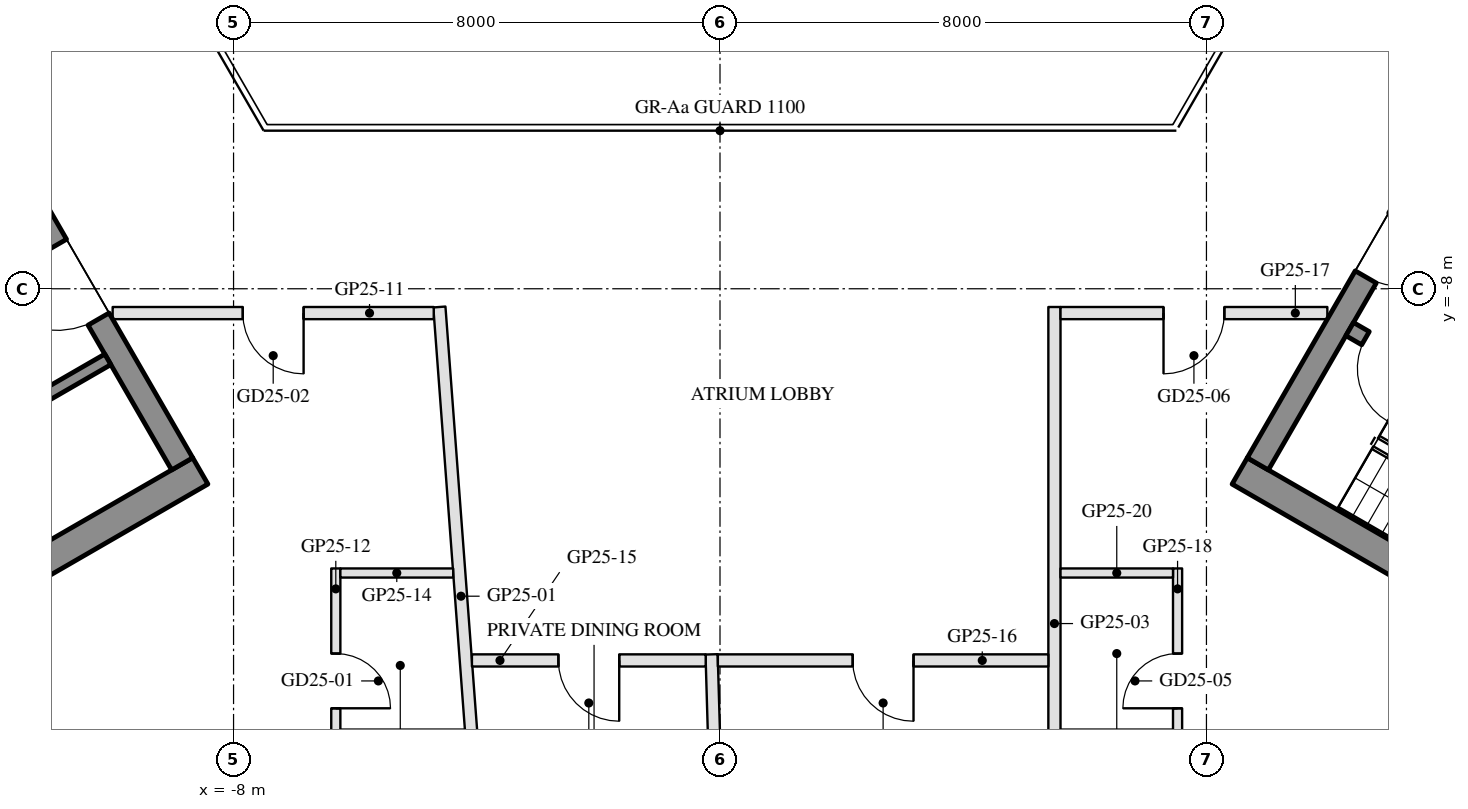
"""IFC4 building model, lengths in metres.
Left out: names, types, materials, properties, quantities, classifications, styles, units other than length and angle.
Written with IfcOpenShell. Run it as: python <this file> out.ifc"""

import sys

from ifc_helpers import new_model, si_unit, direction, frame, frame_2d, origin, place, context, subcontext, project, spatial, rectangle, extrude, element, fill, save


model = new_model("IFC4")
c1 = context("Model", 3, precision=1e-05, world=origin(), true_north=direction((0.0, 1.0)))
c2 = subcontext(c1, "Body", "Model", "MODEL_VIEW")
j1 = project(units=[si_unit("LENGTHUNIT", "METRE"), si_unit("PLANEANGLEUNIT", "RADIAN")], contexts=[c1])
p1 = place(None, origin())
s1 = spatial("IfcSite", under=j1, at=p1, CompositionType="ELEMENT")
p2 = place(p1, origin())
s2 = spatial("IfcBuilding", under=s1, at=p2, CompositionType="ELEMENT")
p3 = place(p2, frame((0.0, 0.0, 257.8)))
s3 = spatial("IfcBuildingStorey", under=s2, at=p3, CompositionType="ELEMENT", Elevation=257.8)
p4 = place(p3, frame((-8.547, -10.997, 0.0), z_axis=(0.0, 0.0, 1.0), x_axis=(-0.86602744543, -0.49999646375, 0.0)))
e1 = element("IfcWall", 1, at=p4, inside=s3, PredefinedType="SHEAR", context=c2, shape_type="SweptSolid", body=[
    extrude(rectangle(XDim=13.934, YDim=0.5, at=frame_2d((6.967, 0.0))), origin(), (0.0, 0.0, 1.0), 3.5),
])
p5 = place(p3, frame((-13.845, -2.22, 0.0), z_axis=(0.0, 0.0, 1.0), x_axis=(0.500004234368, -0.866022959057, 0.0)))
e2 = element("IfcWall", 2, at=p5, inside=s3, PredefinedType="SHEAR", context=c2, shape_type="SweptSolid", body=[
    extrude(rectangle(XDim=10.0, YDim=0.4, at=frame_2d((5.0, 0.0))), origin(), (0.0, 0.0, 1.0), 3.5),
])
p6 = place(p5, frame((3.55, 0.0, 0.0)))
e3 = element("IfcOpeningElement", 3, at=p6, cuts=e2, PredefinedType="OPENING", context=c2, shape_type="SweptSolid", body=[
    extrude(rectangle(XDim=1.1, YDim=2.1, at=frame_2d((0.55, 1.05))), frame((0.0, 0.21, 0.0), z_axis=(0.0, -1.0, 0.0), x_axis=(1.0, 0.0, 0.0)), (0.0, 0.0, 1.0), 0.42),
])
p7 = place(p5, frame((5.85, 0.0, 0.0)))
e4 = element("IfcOpeningElement", 4, at=p7, cuts=e2, PredefinedType="OPENING", context=c2, shape_type="SweptSolid", body=[
    extrude(rectangle(XDim=1.4, YDim=2.1, at=frame_2d((0.7, 1.05))), frame((0.0, 0.21, 0.0), z_axis=(0.0, -1.0, 0.0), x_axis=(1.0, 0.0, 0.0)), (0.0, 0.0, 1.0), 0.42),
])
p8 = place(p3, frame((-10.068, -9.162, 0.0), z_axis=(0.0, 0.0, 1.0), x_axis=(-0.866032725843, -0.499987317609, 0.0)))
e5 = element("IfcWall", 5, at=p8, inside=s3, PredefinedType="SHEAR", context=c2, shape_type="SweptSolid", body=[
    extrude(rectangle(XDim=10.16, YDim=0.2, at=frame_2d((5.08, 0.0))), origin(), (0.0, 0.0, 1.0), 3.5),
])
p9 = place(p8, frame((4.53, 0.0, 0.0)))
e6 = element("IfcOpeningElement", 6, at=p9, cuts=e5, PredefinedType="OPENING", context=c2, shape_type="SweptSolid", body=[
    extrude(rectangle(XDim=0.9, YDim=2.1, at=frame_2d((0.45, 1.05))), frame((0.0, 0.11, 0.0), z_axis=(0.0, -1.0, 0.0), x_axis=(1.0, 0.0, 0.0)), (0.0, 0.0, 1.0), 0.22),
])
p10 = place(p3, frame((8.547, -10.997, 0.0), z_axis=(0.0, 0.0, 1.0), x_axis=(0.86602744543, -0.49999646375, 0.0)))
e7 = element("IfcWall", 7, at=p10, inside=s3, PredefinedType="SHEAR", context=c2, shape_type="SweptSolid", body=[
    extrude(rectangle(XDim=13.934, YDim=0.5, at=frame_2d((6.967, 0.0))), origin(), (0.0, 0.0, 1.0), 3.5),
])
p11 = place(p3, frame((8.845, -10.88, 0.0), z_axis=(0.0, 0.0, 1.0), x_axis=(0.500004234368, 0.866022959057, 0.0)))
e8 = element("IfcWall", 8, at=p11, inside=s3, PredefinedType="SHEAR", context=c2, shape_type="SweptSolid", body=[
    extrude(rectangle(XDim=10.0, YDim=0.4, at=frame_2d((5.0, 0.0))), origin(), (0.0, 0.0, 1.0), 3.5),
])
p12 = place(p11, frame((3.55, 0.0, 0.0)))
e9 = element("IfcOpeningElement", 9, at=p12, cuts=e8, PredefinedType="OPENING", context=c2, shape_type="SweptSolid", body=[
    extrude(rectangle(XDim=1.1, YDim=2.1, at=frame_2d((0.55, 1.05))), frame((0.0, 0.21, 0.0), z_axis=(0.0, -1.0, 0.0), x_axis=(1.0, 0.0, 0.0)), (0.0, 0.0, 1.0), 0.42),
])
p13 = place(p11, frame((5.85, 0.0, 0.0)))
e10 = element("IfcOpeningElement", 10, at=p13, cuts=e8, PredefinedType="OPENING", context=c2, shape_type="SweptSolid", body=[
    extrude(rectangle(XDim=1.4, YDim=2.1, at=frame_2d((0.7, 1.05))), frame((0.0, 0.21, 0.0), z_axis=(0.0, -1.0, 0.0), x_axis=(1.0, 0.0, 0.0)), (0.0, 0.0, 1.0), 0.42),
])
p14 = place(p3, frame((10.356, -8.664, 0.0), z_axis=(0.0, 0.0, 1.0), x_axis=(0.866028629588, -0.499994412703, 0.0)))
e11 = element("IfcWall", 11, at=p14, inside=s3, PredefinedType="SHEAR", context=c2, shape_type="SweptSolid", body=[
    extrude(rectangle(XDim=6.45, YDim=0.25, at=frame_2d((3.225, 0.0))), origin(), (0.0, 0.0, 1.0), 3.5),
])
p15 = place(p14, frame((0.3, 0.0, 0.0)))
e12 = element("IfcOpeningElement", 12, at=p15, cuts=e11, PredefinedType="OPENING", context=c2, shape_type="SweptSolid", body=[
    extrude(rectangle(XDim=1.0, YDim=2.1, at=frame_2d((0.5, 1.05))), frame((0.0, 0.135, 0.0), z_axis=(0.0, -1.0, 0.0), x_axis=(1.0, 0.0, 0.0)), (0.0, 0.0, 1.0), 0.27),
])
p16 = place(p3, frame((-3.903, -17.813, 0.0), z_axis=(0.0, 0.0, 1.0), x_axis=(-0.074602257677, 0.997213368918, 0.0)))
e13 = element("IfcWall", 13, at=p16, inside=s3, PredefinedType="PARTITIONING", context=c2, shape_type="SweptSolid", body=[
    extrude(rectangle(XDim=9.54, YDim=0.2, at=frame_2d((4.77, 0.0))), origin(), (0.0, 0.0, 1.0), 3.0),
])
p17 = place(p3, frame((-0.04, -17.338, 0.0), z_axis=(0.0, 0.0, 1.0), x_axis=(-0.029431403757, 0.999566802406, 0.0)))
e14 = element("IfcWall", 14, at=p17, inside=s3, PredefinedType="PARTITIONING", context=c2, shape_type="SweptSolid", body=[
    extrude(rectangle(XDim=3.326, YDim=0.2, at=frame_2d((1.663, 0.0))), origin(), (0.0, 0.0, 1.0), 3.0),
])
p18 = place(p3, frame((5.5, -18.713, 0.0), z_axis=(0.0, 0.0, 1.0), x_axis=(0.0, 1.0, 0.0)))
e15 = element("IfcWall", 15, at=p18, inside=s3, PredefinedType="PARTITIONING", context=c2, shape_type="SweptSolid", body=[
    extrude(rectangle(XDim=10.413, YDim=0.2, at=frame_2d((5.207, 0.0))), origin(), (0.0, 0.0, 1.0), 3.16),
])
p19 = place(p3, frame((-4.708, -8.4, 0.0), z_axis=(0.0, 0.0, 1.0), x_axis=(-1.0, 0.0, 0.0)))
e16 = element("IfcWall", 16, at=p19, inside=s3, PredefinedType="PARTITIONING", context=c2, shape_type="SweptSolid", body=[
    extrude(rectangle(XDim=5.281, YDim=0.2, at=frame_2d((2.64, 0.0))), origin(), (0.0, 0.0, 1.0), 3.0),
])
p20 = place(p19, frame((2.14, 0.0, 0.0)))
e17 = element("IfcOpeningElement", 17, at=p20, cuts=e16, PredefinedType="OPENING", context=c2, shape_type="SweptSolid", body=[
    extrude(rectangle(XDim=1.0, YDim=2.1, at=frame_2d((0.5, 1.05))), frame((0.0, 0.11, 0.0), z_axis=(0.0, -1.0, 0.0), x_axis=(1.0, 0.0, 0.0)), (0.0, 0.0, 1.0), 0.22),
])
p21 = place(p3, frame((-6.319, -12.6, 0.0), z_axis=(0.0, 0.0, 1.0), x_axis=(0.0, -1.0, 0.0)))
e18 = element("IfcWall", 18, at=p21, inside=s3, PredefinedType="PARTITIONING", context=c2, shape_type="SweptSolid", body=[
    extrude(rectangle(XDim=2.8, YDim=0.15, at=frame_2d((1.4, 0.0))), origin(), (0.0, 0.0, 1.0), 3.55),
])
p22 = place(p21, frame((1.4, 0.0, 0.0)))
e19 = element("IfcOpeningElement", 19, at=p22, cuts=e18, PredefinedType="OPENING", context=c2, shape_type="SweptSolid", body=[
    extrude(rectangle(XDim=0.9, YDim=2.1, at=frame_2d((0.45, 1.05))), frame((0.0, 0.085, 0.0), z_axis=(0.0, -1.0, 0.0), x_axis=(1.0, 0.0, 0.0)), (0.0, 0.0, 1.0), 0.17),
])
p23 = place(p3, frame((-6.243, -12.675, 0.0), z_axis=(0.0, 0.0, 1.0), x_axis=(1.0, 0.0, 0.0)))
e20 = element("IfcWall", 20, at=p23, inside=s3, PredefinedType="PARTITIONING", context=c2, shape_type="SweptSolid", body=[
    extrude(rectangle(XDim=1.855, YDim=0.15, at=frame_2d((0.928, 0.0))), origin(), (0.0, 0.0, 1.0), 3.55),
])
p24 = place(p3, frame((-0.235, -14.113, 0.0), z_axis=(0.0, 0.0, 1.0), x_axis=(-1.0, 0.0, 0.0)))
e21 = element("IfcWall", 21, at=p24, inside=s3, PredefinedType="PARTITIONING", context=c2, shape_type="SweptSolid", body=[
    extrude(rectangle(XDim=3.845, YDim=0.2, at=frame_2d((1.922, 0.0))), origin(), (0.0, 0.0, 1.0), 3.0),
])
p25 = place(p24, frame((1.422, 0.0, 0.0)))
e22 = element("IfcOpeningElement", 22, at=p25, cuts=e21, PredefinedType="OPENING", context=c2, shape_type="SweptSolid", body=[
    extrude(rectangle(XDim=1.0, YDim=2.1, at=frame_2d((0.5, 1.05))), frame((0.0, 0.11, 0.0), z_axis=(0.0, -1.0, 0.0), x_axis=(1.0, 0.0, 0.0)), (0.0, 0.0, 1.0), 0.22),
])
p26 = place(p3, frame((5.4, -14.113, 0.0), z_axis=(0.0, 0.0, 1.0), x_axis=(-1.0, 0.0, 0.0)))
e23 = element("IfcWall", 23, at=p26, inside=s3, PredefinedType="PARTITIONING", context=c2, shape_type="SweptSolid", body=[
    extrude(rectangle(XDim=5.435, YDim=0.2, at=frame_2d((2.718, 0.0))), origin(), (0.0, 0.0, 1.0), 3.0),
])
p27 = place(p26, frame((2.218, 0.0, 0.0)))
e24 = element("IfcOpeningElement", 24, at=p27, cuts=e23, PredefinedType="OPENING", context=c2, shape_type="SweptSolid", body=[
    extrude(rectangle(XDim=1.0, YDim=2.1, at=frame_2d((0.5, 1.05))), frame((0.0, 0.11, 0.0), z_axis=(0.0, -1.0, 0.0), x_axis=(1.0, 0.0, 0.0)), (0.0, 0.0, 1.0), 0.22),
])
p28 = place(p3, frame((9.988, -8.4, 0.0), z_axis=(0.0, 0.0, 1.0), x_axis=(-1.0, 0.0, 0.0)))
e25 = element("IfcWall", 25, at=p28, inside=s3, PredefinedType="PARTITIONING", context=c2, shape_type="SweptSolid", body=[
    extrude(rectangle(XDim=4.388, YDim=0.2, at=frame_2d((2.194, 0.0))), origin(), (0.0, 0.0, 1.0), 3.0),
])
p29 = place(p28, frame((1.694, 0.0, 0.0)))
e26 = element("IfcOpeningElement", 26, at=p29, cuts=e25, PredefinedType="OPENING", context=c2, shape_type="SweptSolid", body=[
    extrude(rectangle(XDim=1.0, YDim=2.1, at=frame_2d((0.5, 1.05))), frame((0.0, 0.11, 0.0), z_axis=(0.0, -1.0, 0.0), x_axis=(1.0, 0.0, 0.0)), (0.0, 0.0, 1.0), 0.22),
])
p30 = place(p3, frame((7.525, -15.4, 0.0), z_axis=(0.0, 0.0, 1.0), x_axis=(0.0, 1.0, 0.0)))
e27 = element("IfcWall", 27, at=p30, inside=s3, PredefinedType="PARTITIONING", context=c2, shape_type="SweptSolid", body=[
    extrude(rectangle(XDim=2.8, YDim=0.15, at=frame_2d((1.4, 0.0))), origin(), (0.0, 0.0, 1.0), 3.0),
])
p31 = place(p30, frame((0.5, 0.0, 0.0)))
e28 = element("IfcOpeningElement", 28, at=p31, cuts=e27, PredefinedType="OPENING", context=c2, shape_type="SweptSolid", body=[
    extrude(rectangle(XDim=0.9, YDim=2.1, at=frame_2d((0.45, 1.05))), frame((0.0, 0.085, 0.0), z_axis=(0.0, -1.0, 0.0), x_axis=(1.0, 0.0, 0.0)), (0.0, 0.0, 1.0), 0.17),
])
p32 = place(p3, frame((5.6, -12.675, 0.0), z_axis=(0.0, 0.0, 1.0), x_axis=(1.0, 0.0, 0.0)))
e29 = element("IfcWall", 29, at=p32, inside=s3, PredefinedType="PARTITIONING", context=c2, shape_type="SweptSolid", body=[
    extrude(rectangle(XDim=1.85, YDim=0.15, at=frame_2d((0.925, 0.0))), origin(), (0.0, 0.0, 1.0), 3.55),
])
p33 = place(p3, frame((10.378, -1.175, 0.0), z_axis=(0.0, 0.0, 1.0), x_axis=(0.50004096614, -0.86600175068, 0.0)))
e30 = element("IfcWall", 30, at=p33, inside=s3, PredefinedType="PARTITIONING", context=c2, shape_type="SweptSolid", body=[
    extrude(rectangle(XDim=3.782, YDim=0.2, at=frame_2d((1.891, 0.0))), origin(), (0.0, 0.0, 1.0), 3.0),
])
p34 = place(p33, frame((1.391, 0.0, 0.0)))
e31 = element("IfcOpeningElement", 31, at=p34, cuts=e30, PredefinedType="OPENING", context=c2, shape_type="SweptSolid", body=[
    extrude(rectangle(XDim=1.0, YDim=2.1, at=frame_2d((0.5, 1.05))), frame((0.0, 0.11, 0.0), z_axis=(0.0, -1.0, 0.0), x_axis=(1.0, 0.0, 0.0)), (0.0, 0.0, 1.0), 0.22),
])
p35 = place(p3, frame((-12.269, -4.45, 0.0), z_axis=(0.0, 0.0, 1.0), x_axis=(0.500009958894, 0.866019653938, 0.0)))
e32 = element("IfcWall", 32, at=p35, inside=s3, PredefinedType="PARTITIONING", context=c2, shape_type="SweptSolid", body=[
    extrude(rectangle(XDim=5.685, YDim=0.2, at=frame_2d((2.842, 0.0))), origin(), (0.0, 0.0, 1.0), 3.0),
])
p36 = place(p35, frame((2.342, 0.0, 0.0)))
e33 = element("IfcOpeningElement", 33, at=p36, cuts=e32, PredefinedType="OPENING", context=c2, shape_type="SweptSolid", body=[
    extrude(rectangle(XDim=1.0, YDim=2.1, at=frame_2d((0.5, 1.05))), frame((0.0, 0.11, 0.0), z_axis=(0.0, -1.0, 0.0), x_axis=(1.0, 0.0, 0.0)), (0.0, 0.0, 1.0), 0.22),
])
p37 = place(p7, frame((1.4, 0.0, 0.0), z_axis=(0.0, 0.0, 1.0), x_axis=(-1.0, 0.0, 0.0)))
e34 = element("IfcDoor", 34, at=p37, inside=s3, OperationType="DOUBLE_DOOR_SINGLE_SWING", PredefinedType="DOOR", context=c2, shape_type="SweptSolid", body=[
    extrude(rectangle(XDim=1.4, YDim=2.1, at=frame_2d((0.7, 1.05))), frame((0.0, 0.025, 0.0), z_axis=(0.0, -1.0, 0.0), x_axis=(1.0, 0.0, 0.0)), (0.0, 0.0, 1.0), 0.05),
])
fill(e4, e34)
p38 = place(p12, frame((1.1, 0.0, 0.0), z_axis=(0.0, 0.0, 1.0), x_axis=(-1.0, 0.0, 0.0)))
e35 = element("IfcDoor", 35, at=p38, inside=s3, OperationType="SINGLE_SWING_LEFT", PredefinedType="DOOR", context=c2, shape_type="SweptSolid", body=[
    extrude(rectangle(XDim=1.1, YDim=2.1, at=frame_2d((0.55, 1.05))), frame((0.0, 0.025, 0.0), z_axis=(0.0, -1.0, 0.0), x_axis=(1.0, 0.0, 0.0)), (0.0, 0.0, 1.0), 0.05),
])
fill(e9, e35)
p39 = place(p15, frame((1.0, 0.0, 0.0), z_axis=(0.0, 0.0, 1.0), x_axis=(-1.0, 0.0, 0.0)))
e36 = element("IfcDoor", 36, at=p39, inside=s3, OperationType="SINGLE_SWING_LEFT", PredefinedType="DOOR", context=c2, shape_type="SweptSolid", body=[
    extrude(rectangle(XDim=1.0, YDim=2.1, at=frame_2d((0.5, 1.05))), frame((0.0, 0.025, 0.0), z_axis=(0.0, -1.0, 0.0), x_axis=(1.0, 0.0, 0.0)), (0.0, 0.0, 1.0), 0.05),
])
fill(e12, e36)
p40 = place(p22, origin())
e37 = element("IfcDoor", 37, at=p40, inside=s3, OperationType="SINGLE_SWING_RIGHT", PredefinedType="DOOR", context=c2, shape_type="SweptSolid", body=[
    extrude(rectangle(XDim=0.9, YDim=2.1, at=frame_2d((0.45, 1.05))), frame((0.0, 0.025, 0.0), z_axis=(0.0, -1.0, 0.0), x_axis=(1.0, 0.0, 0.0)), (0.0, 0.0, 1.0), 0.05),
])
fill(e19, e37)
p41 = place(p20, origin())
e38 = element("IfcDoor", 38, at=p41, inside=s3, OperationType="SINGLE_SWING_LEFT", PredefinedType="DOOR", context=c2, shape_type="SweptSolid", body=[
    extrude(rectangle(XDim=1.0, YDim=2.1, at=frame_2d((0.5, 1.05))), frame((0.0, 0.025, 0.0), z_axis=(0.0, -1.0, 0.0), x_axis=(1.0, 0.0, 0.0)), (0.0, 0.0, 1.0), 0.05),
])
fill(e17, e38)
p42 = place(p25, origin())
e39 = element("IfcDoor", 39, at=p42, inside=s3, OperationType="SINGLE_SWING_LEFT", PredefinedType="DOOR", context=c2, shape_type="SweptSolid", body=[
    extrude(rectangle(XDim=1.0, YDim=2.1, at=frame_2d((0.5, 1.05))), frame((0.0, 0.025, 0.0), z_axis=(0.0, -1.0, 0.0), x_axis=(1.0, 0.0, 0.0)), (0.0, 0.0, 1.0), 0.05),
])
fill(e22, e39)
p43 = place(p27, origin())
e40 = element("IfcDoor", 40, at=p43, inside=s3, OperationType="SINGLE_SWING_LEFT", PredefinedType="DOOR", context=c2, shape_type="SweptSolid", body=[
    extrude(rectangle(XDim=1.0, YDim=2.1, at=frame_2d((0.5, 1.05))), frame((0.0, 0.025, 0.0), z_axis=(0.0, -1.0, 0.0), x_axis=(1.0, 0.0, 0.0)), (0.0, 0.0, 1.0), 0.05),
])
fill(e24, e40)
p44 = place(p31, origin())
e41 = element("IfcDoor", 41, at=p44, inside=s3, OperationType="SINGLE_SWING_LEFT", PredefinedType="DOOR", context=c2, shape_type="SweptSolid", body=[
    extrude(rectangle(XDim=0.9, YDim=2.1, at=frame_2d((0.45, 1.05))), frame((0.0, 0.025, 0.0), z_axis=(0.0, -1.0, 0.0), x_axis=(1.0, 0.0, 0.0)), (0.0, 0.0, 1.0), 0.05),
])
fill(e28, e41)
p45 = place(p29, origin())
e42 = element("IfcDoor", 42, at=p45, inside=s3, OperationType="SINGLE_SWING_RIGHT", PredefinedType="DOOR", context=c2, shape_type="SweptSolid", body=[
    extrude(rectangle(XDim=1.0, YDim=2.1, at=frame_2d((0.5, 1.05))), frame((0.0, 0.025, 0.0), z_axis=(0.0, -1.0, 0.0), x_axis=(1.0, 0.0, 0.0)), (0.0, 0.0, 1.0), 0.05),
])
fill(e26, e42)
save(model, sys.argv[1])
